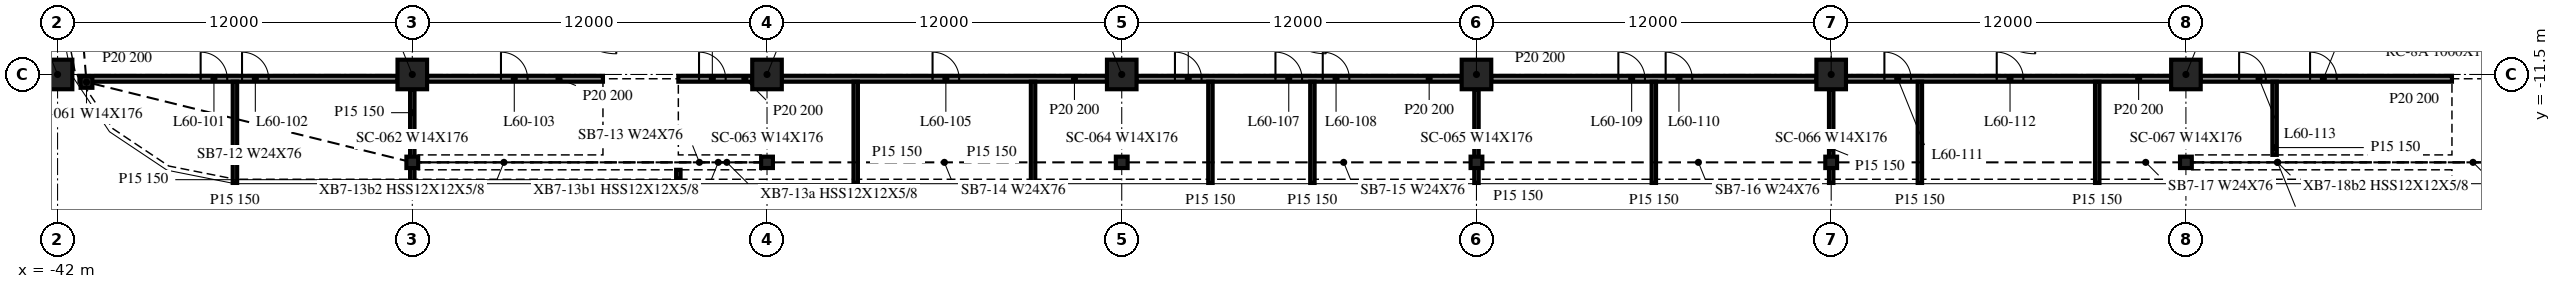
"""IFC4 building model, lengths in metres.
Left out: names, types, materials, properties, quantities, classifications, styles, units other than length and angle.
Written with IfcOpenShell. Run it as: python <this file> out.ifc"""

import sys

from ifc_helpers import new_model, si_unit, direction, frame, frame_2d, origin, origin_2d, place, context, subcontext, project, spatial, rectangle, i_section, extrude, element, fill, save


model = new_model("IFC4")
c1 = context("Model", 3, precision=1e-05, world=origin(), true_north=direction((0.0, 1.0)))
c2 = subcontext(c1, "Body", "Model", "MODEL_VIEW")
j1 = project(units=[si_unit("LENGTHUNIT", "METRE"), si_unit("PLANEANGLEUNIT", "RADIAN")], contexts=[c1])
p1 = place(None, origin())
s1 = spatial("IfcSite", under=j1, at=p1, CompositionType="ELEMENT")
p2 = place(p1, origin())
s2 = spatial("IfcBuilding", under=s1, at=p2, CompositionType="ELEMENT")
p3 = place(p2, frame((0.0, 0.0, 247.6)))
s3 = spatial("IfcBuildingStorey", under=s2, at=p3, CompositionType="ELEMENT", Elevation=247.6)
for number, where, z_axis, x_axis in (
    (1, (-42.0, -11.5, -0.34), (0.0, 0.0, 1.0), (1.0, 0.0, 0.0)),
    (2, (-30.0, -11.5, -0.34), (0.0, 0.0, 1.0), (1.0, 0.0, 0.0)),
    (3, (-18.0, -11.5, -0.34), (0.0, 0.0, 1.0), (1.0, 0.0, 0.0)),
    (4, (-6.0, -11.5, -0.34), (0.0, 0.0, 1.0), (1.0, 0.0, 0.0)),
    (5, (6.0, -11.5, -0.34), (0.0, 0.0, 1.0), (1.0, 0.0, 0.0)),
    (6, (18.0, -11.5, -0.34), (0.0, 0.0, 1.0), (1.0, 0.0, 0.0)),
    (7, (30.0, -11.5, -0.34), (0.0, 0.0, 1.0), (1.0, 0.0, 0.0)),
):
    element("IfcColumn", number, at=place(p3, frame(where, z_axis=z_axis, x_axis=x_axis)), inside=s3, PredefinedType="COLUMN", context=c2, shape_type="SweptSolid", body=[
        extrude(rectangle(XDim=1.0, YDim=1.0, at=origin_2d()), origin(), (0.0, 0.0, 1.0), 3.8),
    ])
for number, where, z_axis, x_axis in (
    (8, (-41.021, -11.758, -0.34), (0.0, 0.0, 1.0), (1.0, 0.0, 0.0)),
    (9, (-30.0, -14.473, -0.34), (0.0, 0.0, 1.0), (1.0, 0.0, 0.0)),
    (10, (-18.0, -14.473, -0.34), (0.0, 0.0, 1.0), (1.0, 0.0, 0.0)),
    (11, (-6.0, -14.473, -0.34), (0.0, 0.0, 1.0), (1.0, 0.0, 0.0)),
    (12, (6.0, -14.473, -0.34), (0.0, 0.0, 1.0), (1.0, 0.0, 0.0)),
    (13, (18.0, -14.473, -0.34), (0.0, 0.0, 1.0), (1.0, 0.0, 0.0)),
    (14, (30.0, -14.473, -0.34), (0.0, 0.0, 1.0), (1.0, 0.0, 0.0)),
):
    element("IfcColumn", number, at=place(p3, frame(where, z_axis=z_axis, x_axis=x_axis)), inside=s3, PredefinedType="COLUMN", context=c2, shape_type="SweptSolid", body=[
        extrude(i_section(OverallWidth=0.399, OverallDepth=0.386, WebThickness=0.021, FlangeThickness=0.033, at=origin_2d()), origin(), (0.0, 0.0, 1.0), 3.8),
    ])
p4 = place(p3, frame((-41.26, -11.645, 0.0), z_axis=(0.0, 0.0, 1.0), x_axis=(1.0, 0.0, 0.0)))
e15 = element("IfcWall", 15, at=p4, inside=s3, PredefinedType="PARTITIONING", context=c2, shape_type="SweptSolid", body=[
    extrude(rectangle(XDim=10.76, YDim=0.2, at=frame_2d((5.38, 0.0))), origin(), (0.0, 0.0, 1.0), 3.46),
])
p5 = place(p4, frame((4.1, 0.0, 0.0)))
e16 = element("IfcOpeningElement", 16, at=p5, cuts=e15, PredefinedType="OPENING", context=c2, shape_type="SweptSolid", body=[
    extrude(rectangle(XDim=0.9, YDim=2.1, at=frame_2d((0.45, 1.05))), frame((0.0, 0.11, 0.0), z_axis=(0.0, -1.0, 0.0), x_axis=(1.0, 0.0, 0.0)), (0.0, 0.0, 1.0), 0.22),
])
p6 = place(p4, frame((5.5, 0.0, 0.0)))
e17 = element("IfcOpeningElement", 17, at=p6, cuts=e15, PredefinedType="OPENING", context=c2, shape_type="SweptSolid", body=[
    extrude(rectangle(XDim=0.9, YDim=2.1, at=frame_2d((0.45, 1.05))), frame((0.0, 0.11, 0.0), z_axis=(0.0, -1.0, 0.0), x_axis=(1.0, 0.0, 0.0)), (0.0, 0.0, 1.0), 0.22),
])
p7 = place(p3, frame((-29.5, -11.645, 0.0), z_axis=(0.0, 0.0, 1.0), x_axis=(1.0, 0.0, 0.0)))
e18 = element("IfcWall", 18, at=p7, inside=s3, PredefinedType="PARTITIONING", context=c2, shape_type="SweptSolid", body=[
    extrude(rectangle(XDim=5.95, YDim=0.2, at=frame_2d((2.975, 0.0))), origin(), (0.0, 0.0, 1.0), 3.46),
])
p8 = place(p7, frame((2.5, 0.0, 0.0)))
e19 = element("IfcOpeningElement", 19, at=p8, cuts=e18, PredefinedType="OPENING", context=c2, shape_type="SweptSolid", body=[
    extrude(rectangle(XDim=0.9, YDim=2.1, at=frame_2d((0.45, 1.05))), frame((0.0, 0.11, 0.0), z_axis=(0.0, -1.0, 0.0), x_axis=(1.0, 0.0, 0.0)), (0.0, 0.0, 1.0), 0.22),
])
p9 = place(p3, frame((-21.0, -11.645, 0.0), z_axis=(0.0, 0.0, 1.0), x_axis=(1.0, 0.0, 0.0)))
e20 = element("IfcWall", 20, at=p9, inside=s3, PredefinedType="PARTITIONING", context=c2, shape_type="SweptSolid", body=[
    extrude(rectangle(XDim=2.5, YDim=0.2, at=frame_2d((1.25, 0.0))), origin(), (0.0, 0.0, 1.0), 3.46),
])
p10 = place(p9, frame((0.7, 0.0, 0.0)))
e21 = element("IfcOpeningElement", 21, at=p10, cuts=e20, PredefinedType="OPENING", context=c2, shape_type="SweptSolid", body=[
    extrude(rectangle(XDim=0.9, YDim=2.1, at=frame_2d((0.45, 1.05))), frame((0.0, 0.11, 0.0), z_axis=(0.0, -1.0, 0.0), x_axis=(1.0, 0.0, 0.0)), (0.0, 0.0, 1.0), 0.22),
])
p11 = place(p3, frame((-17.5, -11.645, 0.0), z_axis=(0.0, 0.0, 1.0), x_axis=(1.0, 0.0, 0.0)))
e22 = element("IfcWall", 22, at=p11, inside=s3, PredefinedType="PARTITIONING", context=c2, shape_type="SweptSolid", body=[
    extrude(rectangle(XDim=11.0, YDim=0.2, at=frame_2d((5.5, 0.0))), origin(), (0.0, 0.0, 1.0), 3.46),
])
p12 = place(p11, frame((5.1, 0.0, 0.0)))
e23 = element("IfcOpeningElement", 23, at=p12, cuts=e22, PredefinedType="OPENING", context=c2, shape_type="SweptSolid", body=[
    extrude(rectangle(XDim=0.9, YDim=2.1, at=frame_2d((0.45, 1.05))), frame((0.0, 0.11, 0.0), z_axis=(0.0, -1.0, 0.0), x_axis=(1.0, 0.0, 0.0)), (0.0, 0.0, 1.0), 0.22),
])
p13 = place(p3, frame((-5.5, -11.645, 0.0), z_axis=(0.0, 0.0, 1.0), x_axis=(1.0, 0.0, 0.0)))
e24 = element("IfcWall", 24, at=p13, inside=s3, PredefinedType="PARTITIONING", context=c2, shape_type="SweptSolid", body=[
    extrude(rectangle(XDim=11.0, YDim=0.2, at=frame_2d((5.5, 0.0))), origin(), (0.0, 0.0, 1.0), 3.46),
])
p14 = place(p13, frame((1.3, 0.0, 0.0)))
e25 = element("IfcOpeningElement", 25, at=p14, cuts=e24, PredefinedType="OPENING", context=c2, shape_type="SweptSolid", body=[
    extrude(rectangle(XDim=0.9, YDim=2.1, at=frame_2d((0.45, 1.05))), frame((0.0, 0.11, 0.0), z_axis=(0.0, -1.0, 0.0), x_axis=(1.0, 0.0, 0.0)), (0.0, 0.0, 1.0), 0.22),
])
p15 = place(p13, frame((4.7, 0.0, 0.0)))
e26 = element("IfcOpeningElement", 26, at=p15, cuts=e24, PredefinedType="OPENING", context=c2, shape_type="SweptSolid", body=[
    extrude(rectangle(XDim=0.9, YDim=2.1, at=frame_2d((0.45, 1.05))), frame((0.0, 0.11, 0.0), z_axis=(0.0, -1.0, 0.0), x_axis=(1.0, 0.0, 0.0)), (0.0, 0.0, 1.0), 0.22),
])
p16 = place(p13, frame((6.3, 0.0, 0.0)))
e27 = element("IfcOpeningElement", 27, at=p16, cuts=e24, PredefinedType="OPENING", context=c2, shape_type="SweptSolid", body=[
    extrude(rectangle(XDim=0.9, YDim=2.1, at=frame_2d((0.45, 1.05))), frame((0.0, 0.11, 0.0), z_axis=(0.0, -1.0, 0.0), x_axis=(1.0, 0.0, 0.0)), (0.0, 0.0, 1.0), 0.22),
])
p17 = place(p3, frame((6.5, -11.645, 0.0), z_axis=(0.0, 0.0, 1.0), x_axis=(1.0, 0.0, 0.0)))
e28 = element("IfcWall", 28, at=p17, inside=s3, PredefinedType="PARTITIONING", context=c2, shape_type="SweptSolid", body=[
    extrude(rectangle(XDim=11.0, YDim=0.2, at=frame_2d((5.5, 0.0))), origin(), (0.0, 0.0, 1.0), 3.46),
])
p18 = place(p17, frame((4.3, 0.0, 0.0)))
e29 = element("IfcOpeningElement", 29, at=p18, cuts=e28, PredefinedType="OPENING", context=c2, shape_type="SweptSolid", body=[
    extrude(rectangle(XDim=0.9, YDim=2.1, at=frame_2d((0.45, 1.05))), frame((0.0, 0.11, 0.0), z_axis=(0.0, -1.0, 0.0), x_axis=(1.0, 0.0, 0.0)), (0.0, 0.0, 1.0), 0.22),
])
p19 = place(p17, frame((5.9, 0.0, 0.0)))
e30 = element("IfcOpeningElement", 30, at=p19, cuts=e28, PredefinedType="OPENING", context=c2, shape_type="SweptSolid", body=[
    extrude(rectangle(XDim=0.9, YDim=2.1, at=frame_2d((0.45, 1.05))), frame((0.0, 0.11, 0.0), z_axis=(0.0, -1.0, 0.0), x_axis=(1.0, 0.0, 0.0)), (0.0, 0.0, 1.0), 0.22),
])
p20 = place(p3, frame((18.5, -11.645, 0.0), z_axis=(0.0, 0.0, 1.0), x_axis=(1.0, 0.0, 0.0)))
e31 = element("IfcWall", 31, at=p20, inside=s3, PredefinedType="PARTITIONING", context=c2, shape_type="SweptSolid", body=[
    extrude(rectangle(XDim=11.0, YDim=0.2, at=frame_2d((5.5, 0.0))), origin(), (0.0, 0.0, 1.0), 3.46),
])
p21 = place(p20, frame((1.3, 0.0, 0.0)))
e32 = element("IfcOpeningElement", 32, at=p21, cuts=e31, PredefinedType="OPENING", context=c2, shape_type="SweptSolid", body=[
    extrude(rectangle(XDim=0.9, YDim=2.1, at=frame_2d((0.45, 1.05))), frame((0.0, 0.11, 0.0), z_axis=(0.0, -1.0, 0.0), x_axis=(1.0, 0.0, 0.0)), (0.0, 0.0, 1.0), 0.22),
])
p22 = place(p20, frame((5.1, 0.0, 0.0)))
e33 = element("IfcOpeningElement", 33, at=p22, cuts=e31, PredefinedType="OPENING", context=c2, shape_type="SweptSolid", body=[
    extrude(rectangle(XDim=0.9, YDim=2.1, at=frame_2d((0.45, 1.05))), frame((0.0, 0.11, 0.0), z_axis=(0.0, -1.0, 0.0), x_axis=(1.0, 0.0, 0.0)), (0.0, 0.0, 1.0), 0.22),
])
p23 = place(p3, frame((30.5, -11.645, 0.0), z_axis=(0.0, 0.0, 1.0), x_axis=(1.0, 0.0, 0.0)))
e34 = element("IfcWall", 34, at=p23, inside=s3, PredefinedType="PARTITIONING", context=c2, shape_type="SweptSolid", body=[
    extrude(rectangle(XDim=8.5, YDim=0.2, at=frame_2d((4.25, 0.0))), origin(), (0.0, 0.0, 1.0), 3.46),
])
p24 = place(p23, frame((1.3, 0.0, 0.0)))
e35 = element("IfcOpeningElement", 35, at=p24, cuts=e34, PredefinedType="OPENING", context=c2, shape_type="SweptSolid", body=[
    extrude(rectangle(XDim=0.9, YDim=2.1, at=frame_2d((0.45, 1.05))), frame((0.0, 0.11, 0.0), z_axis=(0.0, -1.0, 0.0), x_axis=(1.0, 0.0, 0.0)), (0.0, 0.0, 1.0), 0.22),
])
p25 = place(p23, frame((3.7, 0.0, 0.0)))
e36 = element("IfcOpeningElement", 36, at=p25, cuts=e34, PredefinedType="OPENING", context=c2, shape_type="SweptSolid", body=[
    extrude(rectangle(XDim=0.9, YDim=2.1, at=frame_2d((0.45, 1.05))), frame((0.0, 0.11, 0.0), z_axis=(0.0, -1.0, 0.0), x_axis=(1.0, 0.0, 0.0)), (0.0, 0.0, 1.0), 0.22),
])
p26 = place(p3, frame((-36.0, -15.17, 0.0), z_axis=(0.0, 0.0, 1.0), x_axis=(0.0, 1.0, 0.0)))
e37 = element("IfcWall", 37, at=p26, inside=s3, PredefinedType="PARTITIONING", context=c2, shape_type="SweptSolid", body=[
    extrude(rectangle(XDim=3.425, YDim=0.15, at=frame_2d((1.712, 0.0))), origin(), (0.0, 0.0, 1.0), 3.46),
])
p27 = place(p3, frame((-30.0, -15.17, 0.0), z_axis=(0.0, 0.0, 1.0), x_axis=(0.0, 1.0, 0.0)))
e38 = element("IfcWall", 38, at=p27, inside=s3, PredefinedType="PARTITIONING", context=c2, shape_type="SweptSolid", body=[
    extrude(rectangle(XDim=3.17, YDim=0.15, at=frame_2d((1.585, 0.0))), origin(), (0.0, 0.0, 1.0), 3.46),
])
p28 = place(p3, frame((-21.0, -15.17, 0.0), z_axis=(0.0, 0.0, 1.0), x_axis=(0.0, 1.0, 0.0)))
e39 = element("IfcWall", 39, at=p28, inside=s3, PredefinedType="PARTITIONING", context=c2, shape_type="SweptSolid", body=[
    extrude(rectangle(XDim=0.445, YDim=0.15, at=frame_2d((0.222, 0.0))), origin(), (0.0, 0.0, 1.0), 3.46),
])
for number, where, z_axis, x_axis in (
    (40, (-15.0, -15.17, 0.0), (0.0, 0.0, 1.0), (0.0, 1.0, 0.0)),
    (41, (-9.0, -15.17, 0.0), (0.0, 0.0, 1.0), (0.0, 1.0, 0.0)),
    (42, (-3.0, -15.17, 0.0), (0.0, 0.0, 1.0), (0.0, 1.0, 0.0)),
    (43, (0.45, -15.17, 0.0), (0.0, 0.0, 1.0), (0.0, 1.0, 0.0)),
):
    element("IfcWall", number, at=place(p3, frame(where, z_axis=z_axis, x_axis=x_axis)), inside=s3, PredefinedType="PARTITIONING", context=c2, shape_type="SweptSolid", body=[
        extrude(rectangle(XDim=3.425, YDim=0.15, at=frame_2d((1.712, 0.0))), origin(), (0.0, 0.0, 1.0), 3.46),
    ])
p29 = place(p3, frame((6.0, -15.17, 0.0), z_axis=(0.0, 0.0, 1.0), x_axis=(0.0, 1.0, 0.0)))
e44 = element("IfcWall", 44, at=p29, inside=s3, PredefinedType="PARTITIONING", context=c2, shape_type="SweptSolid", body=[
    extrude(rectangle(XDim=3.17, YDim=0.15, at=frame_2d((1.585, 0.0))), origin(), (0.0, 0.0, 1.0), 3.46),
])
p30 = place(p3, frame((12.0, -15.17, 0.0), z_axis=(0.0, 0.0, 1.0), x_axis=(0.0, 1.0, 0.0)))
e45 = element("IfcWall", 45, at=p30, inside=s3, PredefinedType="PARTITIONING", context=c2, shape_type="SweptSolid", body=[
    extrude(rectangle(XDim=3.425, YDim=0.15, at=frame_2d((1.712, 0.0))), origin(), (0.0, 0.0, 1.0), 3.46),
])
p31 = place(p3, frame((18.0, -15.17, 0.0), z_axis=(0.0, 0.0, 1.0), x_axis=(0.0, 1.0, 0.0)))
e46 = element("IfcWall", 46, at=p31, inside=s3, PredefinedType="PARTITIONING", context=c2, shape_type="SweptSolid", body=[
    extrude(rectangle(XDim=3.17, YDim=0.15, at=frame_2d((1.585, 0.0))), origin(), (0.0, 0.0, 1.0), 3.46),
])
for number, where, z_axis, x_axis in (
    (47, (21.0, -15.17, 0.0), (0.0, 0.0, 1.0), (0.0, 1.0, 0.0)),
    (48, (27.0, -15.17, 0.0), (0.0, 0.0, 1.0), (0.0, 1.0, 0.0)),
):
    element("IfcWall", number, at=place(p3, frame(where, z_axis=z_axis, x_axis=x_axis)), inside=s3, PredefinedType="PARTITIONING", context=c2, shape_type="SweptSolid", body=[
        extrude(rectangle(XDim=3.425, YDim=0.15, at=frame_2d((1.712, 0.0))), origin(), (0.0, 0.0, 1.0), 3.46),
    ])
p32 = place(p3, frame((33.0, -14.221, 0.0), z_axis=(0.0, 0.0, 1.0), x_axis=(0.0, 1.0, 0.0)))
e49 = element("IfcWall", 49, at=p32, inside=s3, PredefinedType="PARTITIONING", context=c2, shape_type="SweptSolid", body=[
    extrude(rectangle(XDim=2.476, YDim=0.15, at=frame_2d((1.238, 0.0))), origin(), (0.0, 0.0, 1.0), 3.46),
])
p33 = place(p5, origin())
e50 = element("IfcDoor", 50, at=p33, inside=s3, OperationType="SINGLE_SWING_RIGHT", PredefinedType="DOOR", context=c2, shape_type="SweptSolid", body=[
    extrude(rectangle(XDim=0.9, YDim=2.1, at=frame_2d((0.45, 1.05))), frame((0.0, 0.025, 0.0), z_axis=(0.0, -1.0, 0.0), x_axis=(1.0, 0.0, 0.0)), (0.0, 0.0, 1.0), 0.05),
])
fill(e16, e50)
p34 = place(p6, origin())
e51 = element("IfcDoor", 51, at=p34, inside=s3, OperationType="SINGLE_SWING_LEFT", PredefinedType="DOOR", context=c2, shape_type="SweptSolid", body=[
    extrude(rectangle(XDim=0.9, YDim=2.1, at=frame_2d((0.45, 1.05))), frame((0.0, 0.025, 0.0), z_axis=(0.0, -1.0, 0.0), x_axis=(1.0, 0.0, 0.0)), (0.0, 0.0, 1.0), 0.05),
])
fill(e17, e51)
p35 = place(p8, origin())
e52 = element("IfcDoor", 52, at=p35, inside=s3, OperationType="SINGLE_SWING_RIGHT", PredefinedType="DOOR", context=c2, shape_type="SweptSolid", body=[
    extrude(rectangle(XDim=0.9, YDim=2.1, at=frame_2d((0.45, 1.05))), frame((0.0, 0.025, 0.0), z_axis=(0.0, -1.0, 0.0), x_axis=(1.0, 0.0, 0.0)), (0.0, 0.0, 1.0), 0.05),
])
fill(e19, e52)
p36 = place(p10, origin())
e53 = element("IfcDoor", 53, at=p36, inside=s3, OperationType="SINGLE_SWING_RIGHT", PredefinedType="DOOR", context=c2, shape_type="SweptSolid", body=[
    extrude(rectangle(XDim=0.9, YDim=2.1, at=frame_2d((0.45, 1.05))), frame((0.0, 0.025, 0.0), z_axis=(0.0, -1.0, 0.0), x_axis=(1.0, 0.0, 0.0)), (0.0, 0.0, 1.0), 0.05),
])
fill(e21, e53)
p37 = place(p12, origin())
e54 = element("IfcDoor", 54, at=p37, inside=s3, OperationType="SINGLE_SWING_LEFT", PredefinedType="DOOR", context=c2, shape_type="SweptSolid", body=[
    extrude(rectangle(XDim=0.9, YDim=2.1, at=frame_2d((0.45, 1.05))), frame((0.0, 0.025, 0.0), z_axis=(0.0, -1.0, 0.0), x_axis=(1.0, 0.0, 0.0)), (0.0, 0.0, 1.0), 0.05),
])
fill(e23, e54)
p38 = place(p14, origin())
e55 = element("IfcDoor", 55, at=p38, inside=s3, OperationType="SINGLE_SWING_RIGHT", PredefinedType="DOOR", context=c2, shape_type="SweptSolid", body=[
    extrude(rectangle(XDim=0.9, YDim=2.1, at=frame_2d((0.45, 1.05))), frame((0.0, 0.025, 0.0), z_axis=(0.0, -1.0, 0.0), x_axis=(1.0, 0.0, 0.0)), (0.0, 0.0, 1.0), 0.05),
])
fill(e25, e55)
p39 = place(p15, origin())
e56 = element("IfcDoor", 56, at=p39, inside=s3, OperationType="SINGLE_SWING_RIGHT", PredefinedType="DOOR", context=c2, shape_type="SweptSolid", body=[
    extrude(rectangle(XDim=0.9, YDim=2.1, at=frame_2d((0.45, 1.05))), frame((0.0, 0.025, 0.0), z_axis=(0.0, -1.0, 0.0), x_axis=(1.0, 0.0, 0.0)), (0.0, 0.0, 1.0), 0.05),
])
fill(e26, e56)
p40 = place(p16, origin())
e57 = element("IfcDoor", 57, at=p40, inside=s3, OperationType="SINGLE_SWING_LEFT", PredefinedType="DOOR", context=c2, shape_type="SweptSolid", body=[
    extrude(rectangle(XDim=0.9, YDim=2.1, at=frame_2d((0.45, 1.05))), frame((0.0, 0.025, 0.0), z_axis=(0.0, -1.0, 0.0), x_axis=(1.0, 0.0, 0.0)), (0.0, 0.0, 1.0), 0.05),
])
fill(e27, e57)
p41 = place(p18, origin())
e58 = element("IfcDoor", 58, at=p41, inside=s3, OperationType="SINGLE_SWING_RIGHT", PredefinedType="DOOR", context=c2, shape_type="SweptSolid", body=[
    extrude(rectangle(XDim=0.9, YDim=2.1, at=frame_2d((0.45, 1.05))), frame((0.0, 0.025, 0.0), z_axis=(0.0, -1.0, 0.0), x_axis=(1.0, 0.0, 0.0)), (0.0, 0.0, 1.0), 0.05),
])
fill(e29, e58)
p42 = place(p19, origin())
e59 = element("IfcDoor", 59, at=p42, inside=s3, OperationType="SINGLE_SWING_LEFT", PredefinedType="DOOR", context=c2, shape_type="SweptSolid", body=[
    extrude(rectangle(XDim=0.9, YDim=2.1, at=frame_2d((0.45, 1.05))), frame((0.0, 0.025, 0.0), z_axis=(0.0, -1.0, 0.0), x_axis=(1.0, 0.0, 0.0)), (0.0, 0.0, 1.0), 0.05),
])
fill(e30, e59)
p43 = place(p21, origin())
e60 = element("IfcDoor", 60, at=p43, inside=s3, OperationType="SINGLE_SWING_RIGHT", PredefinedType="DOOR", context=c2, shape_type="SweptSolid", body=[
    extrude(rectangle(XDim=0.9, YDim=2.1, at=frame_2d((0.45, 1.05))), frame((0.0, 0.025, 0.0), z_axis=(0.0, -1.0, 0.0), x_axis=(1.0, 0.0, 0.0)), (0.0, 0.0, 1.0), 0.05),
])
fill(e32, e60)
p44 = place(p22, origin())
e61 = element("IfcDoor", 61, at=p44, inside=s3, OperationType="SINGLE_SWING_LEFT", PredefinedType="DOOR", context=c2, shape_type="SweptSolid", body=[
    extrude(rectangle(XDim=0.9, YDim=2.1, at=frame_2d((0.45, 1.05))), frame((0.0, 0.025, 0.0), z_axis=(0.0, -1.0, 0.0), x_axis=(1.0, 0.0, 0.0)), (0.0, 0.0, 1.0), 0.05),
])
fill(e33, e61)
p45 = place(p24, origin())
e62 = element("IfcDoor", 62, at=p45, inside=s3, OperationType="SINGLE_SWING_RIGHT", PredefinedType="DOOR", context=c2, shape_type="SweptSolid", body=[
    extrude(rectangle(XDim=0.9, YDim=2.1, at=frame_2d((0.45, 1.05))), frame((0.0, 0.025, 0.0), z_axis=(0.0, -1.0, 0.0), x_axis=(1.0, 0.0, 0.0)), (0.0, 0.0, 1.0), 0.05),
])
fill(e35, e62)
p46 = place(p25, origin())
e63 = element("IfcDoor", 63, at=p46, inside=s3, OperationType="SINGLE_SWING_RIGHT", PredefinedType="DOOR", context=c2, shape_type="SweptSolid", body=[
    extrude(rectangle(XDim=0.9, YDim=2.1, at=frame_2d((0.45, 1.05))), frame((0.0, 0.025, 0.0), z_axis=(0.0, -1.0, 0.0), x_axis=(1.0, 0.0, 0.0)), (0.0, 0.0, 1.0), 0.05),
])
fill(e36, e63)
save(model, sys.argv[1])
